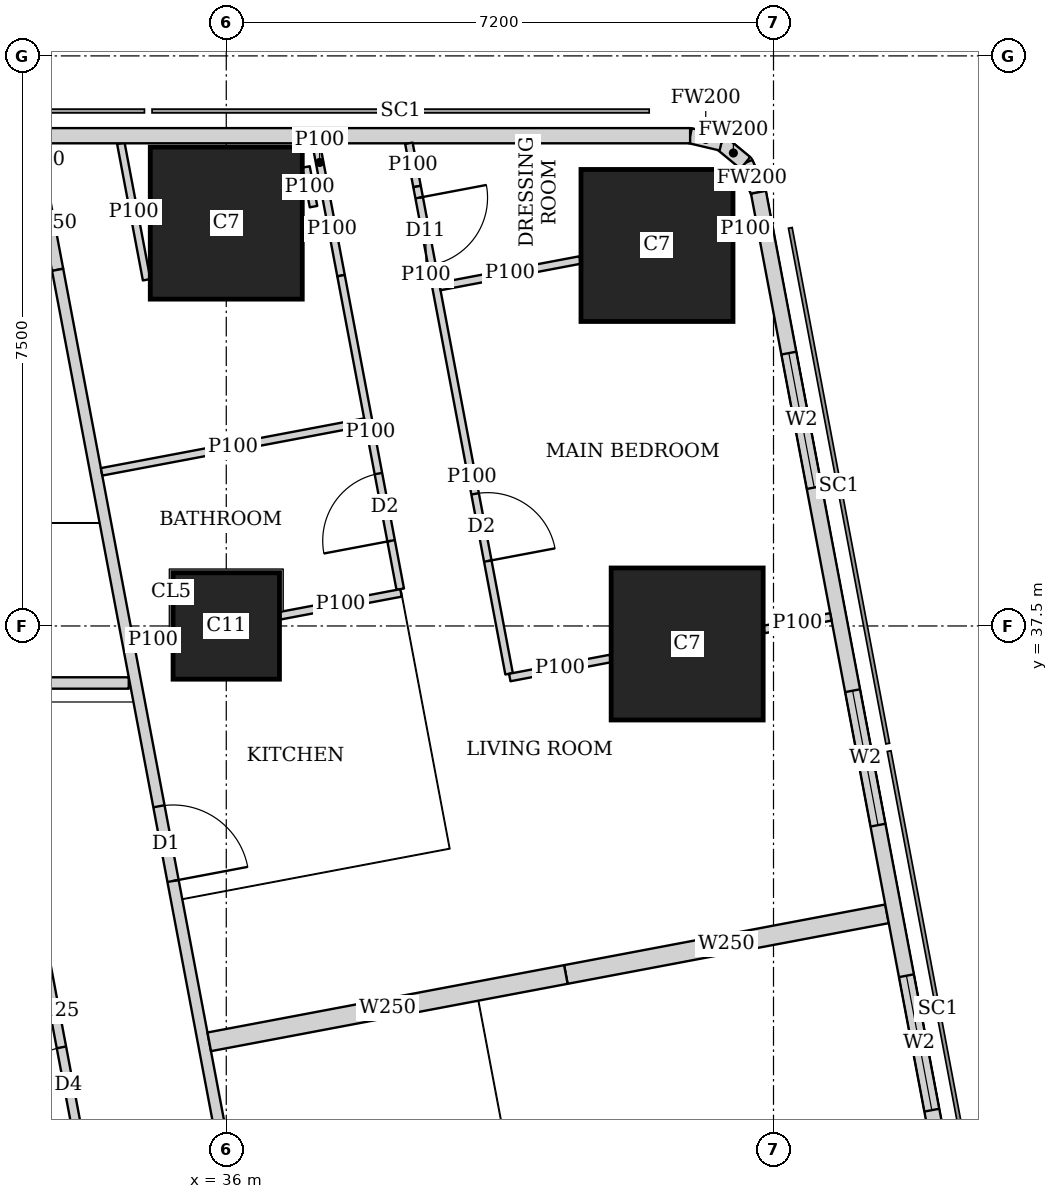
"""IFC4 building model, lengths in metres.
Left out: names, types, materials, properties, quantities, classifications, styles, units other than length and angle.
Written with IfcOpenShell. Run it as: python <this file> out.ifc"""

import sys

from ifc_helpers import new_model, si_unit, direction, frame, frame_2d, origin, origin_2d, place, context, subcontext, project, spatial, rectangle, extrude, element, fill, save


model = new_model("IFC4")
c1 = context("Model", 3, precision=1e-05, world=origin(), true_north=direction((0.0, 1.0)))
c2 = subcontext(c1, "Body", "Model", "MODEL_VIEW")
j1 = project(units=[si_unit("LENGTHUNIT", "METRE"), si_unit("PLANEANGLEUNIT", "RADIAN")], contexts=[c1])
p1 = place(None, origin())
s1 = spatial("IfcSite", under=j1, at=p1, CompositionType="ELEMENT")
p2 = place(p1, origin())
s2 = spatial("IfcBuilding", under=s1, at=p2, CompositionType="ELEMENT")
p3 = place(p2, frame((0.0, 0.0, 259.1)))
s3 = spatial("IfcBuildingStorey", under=s2, at=p3, CompositionType="ELEMENT", Elevation=259.1)
p4 = place(p3, frame((36.0, 37.5, 0.0), z_axis=(0.0, 0.0, 1.0), x_axis=(1.0, 0.0, 0.0)))
e1 = element("IfcColumn", 1, at=p4, inside=s3, PredefinedType="COLUMN", context=c2, shape_type="SweptSolid", body=[
    extrude(rectangle(XDim=1.4, YDim=1.4, at=origin_2d()), origin(), (0.0, 0.0, 1.0), 3.75),
])
for number, where, z_axis, x_axis in (
    (2, (42.064, 37.263, 0.0), (0.0, 0.0, 1.0), (1.0, 0.0, 0.0)),
    (3, (36.0, 42.8, 0.0), (0.0, 0.0, 1.0), (1.0, 0.0, 0.0)),
    (4, (41.667, 42.506, 0.0), (0.0, 0.0, 1.0), (1.0, 0.0, 0.0)),
):
    element("IfcColumn", number, at=place(p3, frame(where, z_axis=z_axis, x_axis=x_axis)), inside=s3, PredefinedType="COLUMN", context=c2, shape_type="SweptSolid", body=[
        extrude(rectangle(XDim=2.0, YDim=2.0, at=origin_2d()), origin(), (0.0, 0.0, 1.0), 3.75),
    ])
p5 = place(p3, frame((49.684, 7.832, 0.0), z_axis=(0.0, 0.0, 1.0), x_axis=(-0.185616669694, 0.982622232565, 0.0)))
e5 = element("IfcWall", 5, at=p5, inside=s3, PredefinedType="SOLIDWALL", context=c2, shape_type="SweptSolid", body=[
    extrude(rectangle(XDim=36.0, YDim=0.2, at=frame_2d((18.0, 0.0))), origin(), (0.0, 0.0, 1.0), 3.5),
])
p6 = place(p5, frame((2.518, 0.0, 0.9)))
e6 = element("IfcOpeningElement", 6, at=p6, cuts=e5, PredefinedType="OPENING", context=c2, shape_type="SweptSolid", body=[
    extrude(rectangle(XDim=2.4, YDim=1.5, at=frame_2d((1.2, 0.75))), frame((0.0, 0.11, 0.0), z_axis=(0.0, -1.0, 0.0), x_axis=(1.0, 0.0, 0.0)), (0.0, 0.0, 1.0), 0.22),
])
p7 = place(p5, frame((8.444, 0.0, 0.9)))
e7 = element("IfcOpeningElement", 7, at=p7, cuts=e5, PredefinedType="OPENING", context=c2, shape_type="SweptSolid", body=[
    extrude(rectangle(XDim=1.8, YDim=1.5, at=frame_2d((0.9, 0.75))), frame((0.0, 0.11, 0.0), z_axis=(0.0, -1.0, 0.0), x_axis=(1.0, 0.0, 0.0)), (0.0, 0.0, 1.0), 0.22),
])
p8 = place(p5, frame((12.261, 0.0, 0.9)))
e8 = element("IfcOpeningElement", 8, at=p8, cuts=e5, PredefinedType="OPENING", context=c2, shape_type="SweptSolid", body=[
    extrude(rectangle(XDim=1.8, YDim=1.5, at=frame_2d((0.9, 0.75))), frame((0.0, 0.11, 0.0), z_axis=(0.0, -1.0, 0.0), x_axis=(1.0, 0.0, 0.0)), (0.0, 0.0, 1.0), 0.22),
])
p9 = place(p5, frame((16.078, 0.0, 0.9)))
e9 = element("IfcOpeningElement", 9, at=p9, cuts=e5, PredefinedType="OPENING", context=c2, shape_type="SweptSolid", body=[
    extrude(rectangle(XDim=1.8, YDim=1.5, at=frame_2d((0.9, 0.75))), frame((0.0, 0.11, 0.0), z_axis=(0.0, -1.0, 0.0), x_axis=(1.0, 0.0, 0.0)), (0.0, 0.0, 1.0), 0.22),
])
p10 = place(p5, frame((19.894, 0.0, 0.9)))
e10 = element("IfcOpeningElement", 10, at=p10, cuts=e5, PredefinedType="OPENING", context=c2, shape_type="SweptSolid", body=[
    extrude(rectangle(XDim=1.8, YDim=1.5, at=frame_2d((0.9, 0.75))), frame((0.0, 0.11, 0.0), z_axis=(0.0, -1.0, 0.0), x_axis=(1.0, 0.0, 0.0)), (0.0, 0.0, 1.0), 0.22),
])
p11 = place(p5, frame((23.71, 0.0, 0.9)))
e11 = element("IfcOpeningElement", 11, at=p11, cuts=e5, PredefinedType="OPENING", context=c2, shape_type="SweptSolid", body=[
    extrude(rectangle(XDim=1.8, YDim=1.5, at=frame_2d((0.9, 0.75))), frame((0.0, 0.11, 0.0), z_axis=(0.0, -1.0, 0.0), x_axis=(1.0, 0.0, 0.0)), (0.0, 0.0, 1.0), 0.22),
])
p12 = place(p5, frame((27.526, 0.0, 0.9)))
e12 = element("IfcOpeningElement", 12, at=p12, cuts=e5, PredefinedType="OPENING", context=c2, shape_type="SweptSolid", body=[
    extrude(rectangle(XDim=1.8, YDim=1.5, at=frame_2d((0.9, 0.75))), frame((0.0, 0.11, 0.0), z_axis=(0.0, -1.0, 0.0), x_axis=(1.0, 0.0, 0.0)), (0.0, 0.0, 1.0), 0.22),
])
p13 = place(p5, frame((32.046, 0.0, 0.9)))
e13 = element("IfcOpeningElement", 13, at=p13, cuts=e5, PredefinedType="OPENING", context=c2, shape_type="SweptSolid", body=[
    extrude(rectangle(XDim=1.8, YDim=1.5, at=frame_2d((0.9, 0.75))), frame((0.0, 0.11, 0.0), z_axis=(0.0, -1.0, 0.0), x_axis=(1.0, 0.0, 0.0)), (0.0, 0.0, 1.0), 0.22),
])
p14 = place(p3, frame((43.002, 43.206, 0.0), z_axis=(0.0, 0.0, 1.0), x_axis=(-0.40678170573, 0.913525393124, 0.0)))
e14 = element("IfcWall", 14, at=p14, inside=s3, PredefinedType="SOLIDWALL", context=c2, shape_type="SweptSolid", body=[
    extrude(rectangle(XDim=0.423, YDim=0.2, at=frame_2d((0.211, 0.0))), origin(), (0.0, 0.0, 1.0), 3.5),
])
p15 = place(p3, frame((42.83, 43.592, 0.0), z_axis=(0.0, 0.0, 1.0), x_axis=(-0.771190539797, 0.636604391539, 0.0)))
e15 = element("IfcWall", 15, at=p15, inside=s3, PredefinedType="SOLIDWALL", context=c2, shape_type="SweptSolid", body=[
    extrude(rectangle(XDim=0.41, YDim=0.2, at=frame_2d((0.205, 0.0))), origin(), (0.0, 0.0, 1.0), 3.5),
])
p16 = place(p3, frame((42.514, 43.853, 0.0), z_axis=(0.0, 0.0, 1.0), x_axis=(-0.973288080424, 0.229587265555, 0.0)))
e16 = element("IfcWall", 16, at=p16, inside=s3, PredefinedType="SOLIDWALL", context=c2, shape_type="SweptSolid", body=[
    extrude(rectangle(XDim=0.422, YDim=0.2, at=frame_2d((0.211, 0.0))), origin(), (0.0, 0.0, 1.0), 3.5),
])
p17 = place(p3, frame((42.103, 43.95, 0.0), z_axis=(0.0, 0.0, 1.0), x_axis=(-1.0, 0.0, 0.0)))
e17 = element("IfcWall", 17, at=p17, inside=s3, PredefinedType="SOLIDWALL", context=c2, shape_type="SweptSolid", body=[
    extrude(rectangle(XDim=27.54, YDim=0.2, at=frame_2d((13.77, 0.0))), origin(), (0.0, 0.0, 1.0), 3.5),
])
p18 = place(p17, frame((10.603, 0.0, 0.9)))
e18 = element("IfcOpeningElement", 18, at=p18, cuts=e17, PredefinedType="OPENING", context=c2, shape_type="SweptSolid", body=[
    extrude(rectangle(XDim=1.8, YDim=1.5, at=frame_2d((0.9, 0.75))), frame((0.0, 0.11, 0.0), z_axis=(0.0, -1.0, 0.0), x_axis=(1.0, 0.0, 0.0)), (0.0, 0.0, 1.0), 0.22),
])
p19 = place(p17, frame((14.203, 0.0, 0.9)))
e19 = element("IfcOpeningElement", 19, at=p19, cuts=e17, PredefinedType="OPENING", context=c2, shape_type="SweptSolid", body=[
    extrude(rectangle(XDim=1.8, YDim=1.5, at=frame_2d((0.9, 0.75))), frame((0.0, 0.11, 0.0), z_axis=(0.0, -1.0, 0.0), x_axis=(1.0, 0.0, 0.0)), (0.0, 0.0, 1.0), 0.22),
])
p20 = place(p17, frame((17.803, 0.0, 0.9)))
e20 = element("IfcOpeningElement", 20, at=p20, cuts=e17, PredefinedType="OPENING", context=c2, shape_type="SweptSolid", body=[
    extrude(rectangle(XDim=1.8, YDim=1.5, at=frame_2d((0.9, 0.75))), frame((0.0, 0.11, 0.0), z_axis=(0.0, -1.0, 0.0), x_axis=(1.0, 0.0, 0.0)), (0.0, 0.0, 1.0), 0.22),
])
p21 = place(p17, frame((22.822, 0.0, 0.9)))
e21 = element("IfcOpeningElement", 21, at=p21, cuts=e17, PredefinedType="OPENING", context=c2, shape_type="SweptSolid", body=[
    extrude(rectangle(XDim=2.4, YDim=1.5, at=frame_2d((1.2, 0.75))), frame((0.0, 0.11, 0.0), z_axis=(0.0, -1.0, 0.0), x_axis=(1.0, 0.0, 0.0)), (0.0, 0.0, 1.0), 0.22),
])
p22 = place(p3, frame((29.501, 36.75, 0.0), z_axis=(0.0, 0.0, 1.0), x_axis=(1.0, 0.0, 0.0)))
e22 = element("IfcWall", 22, at=p22, inside=s3, PredefinedType="SOLIDWALL", context=c2, shape_type="SweptSolid", body=[
    extrude(rectangle(XDim=5.216, YDim=0.15, at=frame_2d((2.608, 0.0))), origin(), (0.0, 0.0, 1.0), 3.5),
])
p23 = place(p22, frame((1.803, 0.0, 0.0)))
e23 = element("IfcOpeningElement", 23, at=p23, cuts=e22, PredefinedType="OPENING", context=c2, shape_type="SweptSolid", body=[
    extrude(rectangle(XDim=1.0, YDim=2.1, at=frame_2d((0.5, 1.05))), frame((0.0, 0.085, 0.0), z_axis=(0.0, -1.0, 0.0), x_axis=(1.0, 0.0, 0.0)), (0.0, 0.0, 1.0), 0.17),
])
p24 = place(p3, frame((33.549, 43.414, 0.0), z_axis=(0.0, 0.0, 1.0), x_axis=(0.185585816539, -0.982628060204, 0.0)))
e24 = element("IfcWall", 24, at=p24, inside=s3, PredefinedType="SOLIDWALL", context=c2, shape_type="SweptSolid", body=[
    extrude(rectangle(XDim=1.25, YDim=0.15, at=frame_2d((0.625, 0.0))), origin(), (0.0, 0.0, 1.0), 2.05),
])
p25 = place(p3, frame((33.781, 42.186, 0.0), z_axis=(0.0, 0.0, 1.0), x_axis=(0.185593518645, -0.9826266055, 0.0)))
e25 = element("IfcWall", 25, at=p25, inside=s3, PredefinedType="SOLIDWALL", context=c2, shape_type="SweptSolid", body=[
    extrude(rectangle(XDim=35.961, YDim=0.15, at=frame_2d((17.98, 0.0))), origin(), (0.0, 0.0, 1.0), 2.5),
])
p26 = place(p25, frame((7.183, 0.0, 0.0)))
e26 = element("IfcOpeningElement", 26, at=p26, cuts=e25, PredefinedType="OPENING", context=c2, shape_type="SweptSolid", body=[
    extrude(rectangle(XDim=1.0, YDim=2.1, at=frame_2d((0.5, 1.05))), frame((0.0, 0.085, 0.0), z_axis=(0.0, -1.0, 0.0), x_axis=(1.0, 0.0, 0.0)), (0.0, 0.0, 1.0), 0.17),
])
p27 = place(p25, frame((11.76, 0.0, 0.0)))
e27 = element("IfcOpeningElement", 27, at=p27, cuts=e25, PredefinedType="OPENING", context=c2, shape_type="SweptSolid", body=[
    extrude(rectangle(XDim=1.0, YDim=2.1, at=frame_2d((0.5, 1.05))), frame((0.0, 0.085, 0.0), z_axis=(0.0, -1.0, 0.0), x_axis=(1.0, 0.0, 0.0)), (0.0, 0.0, 1.0), 0.17),
])
p28 = place(p25, frame((23.863, 0.0, 0.0)))
e28 = element("IfcOpeningElement", 28, at=p28, cuts=e25, PredefinedType="OPENING", context=c2, shape_type="SweptSolid", body=[
    extrude(rectangle(XDim=1.0, YDim=2.1, at=frame_2d((0.5, 1.05))), frame((0.0, 0.085, 0.0), z_axis=(0.0, -1.0, 0.0), x_axis=(1.0, 0.0, 0.0)), (0.0, 0.0, 1.0), 0.17),
])
p29 = place(p25, frame((30.502, 0.0, 0.0)))
e29 = element("IfcOpeningElement", 29, at=p29, cuts=e25, PredefinedType="OPENING", context=c2, shape_type="SweptSolid", body=[
    extrude(rectangle(XDim=1.0, YDim=2.1, at=frame_2d((0.5, 1.05))), frame((0.0, 0.085, 0.0), z_axis=(0.0, -1.0, 0.0), x_axis=(1.0, 0.0, 0.0)), (0.0, 0.0, 1.0), 0.17),
])
p30 = place(p3, frame((34.952, 42.055, 0.0), z_axis=(0.0, 0.0, 1.0), x_axis=(-0.185490642006, 0.98264603074, 0.0)))
e30 = element("IfcWall", 30, at=p30, inside=s3, PredefinedType="PARTITIONING", context=c2, shape_type="SweptSolid", body=[
    extrude(rectangle(XDim=1.827, YDim=0.1, at=frame_2d((0.914, 0.0))), origin(), (0.0, 0.0, 1.0), 2.05),
])
p31 = place(p3, frame((37.049, 43.539, 0.0), z_axis=(0.0, 0.0, 1.0), x_axis=(0.186119495745, -0.982527115811, 0.0)))
e31 = element("IfcWall", 31, at=p31, inside=s3, PredefinedType="PARTITIONING", context=c2, shape_type="SweptSolid", body=[
    extrude(rectangle(XDim=0.531, YDim=0.1, at=frame_2d((0.266, 0.0))), origin(), (0.0, 0.0, 1.0), 2.05),
])
p32 = place(p3, frame((38.403, 43.85, 0.0), z_axis=(0.0, 0.0, 1.0), x_axis=(0.184976954078, -0.982742858768, 0.0)))
e32 = element("IfcWall", 32, at=p32, inside=s3, PredefinedType="PARTITIONING", context=c2, shape_type="SweptSolid", body=[
    extrude(rectangle(XDim=0.578, YDim=0.1, at=frame_2d((0.289, 0.0))), origin(), (0.0, 0.0, 1.0), 3.5),
])
p33 = place(p3, frame((38.51, 43.282, 0.0), z_axis=(0.0, 0.0, 1.0), x_axis=(0.185775287495, -0.982592256511, 0.0)))
e33 = element("IfcWall", 33, at=p33, inside=s3, PredefinedType="PARTITIONING", context=c2, shape_type="SweptSolid", body=[
    extrude(rectangle(XDim=1.259, YDim=0.1, at=frame_2d((0.629, 0.0))), origin(), (0.0, 0.0, 1.0), 2.05),
])
p34 = place(p33, frame((0.15, 0.0, 0.0)))
e34 = element("IfcOpeningElement", 34, at=p34, cuts=e33, PredefinedType="OPENING", context=c2, shape_type="SweptSolid", body=[
    extrude(rectangle(XDim=0.9, YDim=2.0, at=frame_2d((0.45, 1.0))), frame((0.0, 0.06, 0.0), z_axis=(0.0, -1.0, 0.0), x_axis=(1.0, 0.0, 0.0)), (0.0, 0.0, 1.0), 0.12),
])
p35 = place(p3, frame((38.744, 42.045, 0.0), z_axis=(0.0, 0.0, 1.0), x_axis=(0.185564988614, -0.982631993679, 0.0)))
e35 = element("IfcWall", 35, at=p35, inside=s3, PredefinedType="PARTITIONING", context=c2, shape_type="SweptSolid", body=[
    extrude(rectangle(XDim=5.265, YDim=0.1, at=frame_2d((2.633, 0.0))), origin(), (0.0, 0.0, 1.0), 3.5),
])
p36 = place(p35, frame((2.856, 0.0, 0.0)))
e36 = element("IfcOpeningElement", 36, at=p36, cuts=e35, PredefinedType="OPENING", context=c2, shape_type="SweptSolid", body=[
    extrude(rectangle(XDim=0.9, YDim=2.1, at=frame_2d((0.45, 1.05))), frame((0.0, 0.06, 0.0), z_axis=(0.0, -1.0, 0.0), x_axis=(1.0, 0.0, 0.0)), (0.0, 0.0, 1.0), 0.12),
])
p37 = place(p3, frame((37.181, 43.85, 0.0), z_axis=(0.0, 0.0, 1.0), x_axis=(0.185121727606, -0.982715597703, 0.0)))
e37 = element("IfcWall", 37, at=p37, inside=s3, PredefinedType="PARTITIONING", context=c2, shape_type="SweptSolid", body=[
    extrude(rectangle(XDim=0.513, YDim=0.1, at=frame_2d((0.256, 0.0))), origin(), (0.0, 0.0, 1.0), 3.5),
])
p38 = place(p3, frame((37.276, 43.346, 0.0), z_axis=(0.0, 0.0, 1.0), x_axis=(0.185962504646, -0.982556841544, 0.0)))
e38 = element("IfcWall", 38, at=p38, inside=s3, PredefinedType="PARTITIONING", context=c2, shape_type="SweptSolid", body=[
    extrude(rectangle(XDim=1.259, YDim=0.1, at=frame_2d((0.629, 0.0))), origin(), (0.0, 0.0, 1.0), 2.05),
])
p39 = place(p3, frame((37.51, 42.109, 0.0), z_axis=(0.0, 0.0, 1.0), x_axis=(0.185580569503, -0.98262905118, 0.0)))
e39 = element("IfcWall", 39, at=p39, inside=s3, PredefinedType="PARTITIONING", context=c2, shape_type="SweptSolid", body=[
    extrude(rectangle(XDim=4.198, YDim=0.1, at=frame_2d((2.099, 0.0))), origin(), (0.0, 0.0, 1.0), 3.5),
])
p40 = place(p39, frame((2.65, 0.0, 0.0)))
e40 = element("IfcOpeningElement", 40, at=p40, cuts=e39, PredefinedType="OPENING", context=c2, shape_type="SweptSolid", body=[
    extrude(rectangle(XDim=0.9, YDim=2.1, at=frame_2d((0.45, 1.05))), frame((0.0, 0.06, 0.0), z_axis=(0.0, -1.0, 0.0), x_axis=(1.0, 0.0, 0.0)), (0.0, 0.0, 1.0), 0.12),
])
p41 = place(p3, frame((42.985, 42.755, 0.0), z_axis=(0.0, 0.0, 1.0), x_axis=(-0.98281924824, -0.184570651215, 0.0)))
e41 = element("IfcWall", 41, at=p41, inside=s3, PredefinedType="PARTITIONING", context=c2, shape_type="SweptSolid", body=[
    extrude(rectangle(XDim=0.313, YDim=0.1, at=frame_2d((0.157, 0.0))), origin(), (0.0, 0.0, 1.0), 3.5),
])
p42 = place(p3, frame((40.657, 42.315, 0.0), z_axis=(0.0, 0.0, 1.0), x_axis=(-0.982622785543, -0.185613742305, 0.0)))
e42 = element("IfcWall", 42, at=p42, inside=s3, PredefinedType="PARTITIONING", context=c2, shape_type="SweptSolid", body=[
    extrude(rectangle(XDim=1.88, YDim=0.1, at=frame_2d((0.94, 0.0))), origin(), (0.0, 0.0, 1.0), 2.05),
])
p43 = place(p3, frame((43.955, 37.62, 0.0), z_axis=(0.0, 0.0, 1.0), x_axis=(-0.982708424405, -0.18515980288, 0.0)))
e43 = element("IfcWall", 43, at=p43, inside=s3, PredefinedType="PARTITIONING", context=c2, shape_type="SweptSolid", body=[
    extrude(rectangle(XDim=0.897, YDim=0.1, at=frame_2d((0.448, 0.0))), origin(), (0.0, 0.0, 1.0), 3.5),
])
p44 = place(p3, frame((41.054, 37.072, 0.0), z_axis=(0.0, 0.0, 1.0), x_axis=(-0.982635482721, -0.18554651195, 0.0)))
e44 = element("IfcWall", 44, at=p44, inside=s3, PredefinedType="PARTITIONING", context=c2, shape_type="SweptSolid", body=[
    extrude(rectangle(XDim=1.347, YDim=0.1, at=frame_2d((0.674, 0.0))), origin(), (0.0, 0.0, 1.0), 3.5),
])
p45 = place(p3, frame((37.823, 40.182, 0.0), z_axis=(0.0, 0.0, 1.0), x_axis=(-0.98263926043, -0.185526504472, 0.0)))
e45 = element("IfcWall", 45, at=p45, inside=s3, PredefinedType="PARTITIONING", context=c2, shape_type="SweptSolid", body=[
    extrude(rectangle(XDim=3.524, YDim=0.1, at=frame_2d((1.762, 0.0))), origin(), (0.0, 0.0, 1.0), 3.5),
])
p46 = place(p3, frame((38.299, 37.935, 0.0), z_axis=(0.0, 0.0, 1.0), x_axis=(-0.98263725405, -0.185537130931, 0.0)))
e46 = element("IfcWall", 46, at=p46, inside=s3, PredefinedType="PARTITIONING", context=c2, shape_type="SweptSolid", body=[
    extrude(rectangle(XDim=1.617, YDim=0.1, at=frame_2d((0.809, 0.0))), origin(), (0.0, 0.0, 1.0), 3.5),
])
p47 = place(p3, frame((35.29, 37.366, 0.0), z_axis=(0.0, 0.0, 1.0), x_axis=(-0.982715597703, -0.185121727606, 0.0)))
e47 = element("IfcWall", 47, at=p47, inside=s3, PredefinedType="PARTITIONING", context=c2, shape_type="SweptSolid", body=[
    extrude(rectangle(XDim=0.513, YDim=0.1, at=frame_2d((0.256, 0.0))), origin(), (0.0, 0.0, 1.0), 3.5),
])
p48 = place(p3, frame((44.693, 33.713, 0.0), z_axis=(0.0, 0.0, 1.0), x_axis=(-0.982633535512, -0.185556823879, 0.0)))
e48 = element("IfcWall", 48, at=p48, inside=s3, PredefinedType="SOLIDWALL", context=c2, shape_type="SweptSolid", body=[
    extrude(rectangle(XDim=4.3, YDim=0.25, at=frame_2d((2.15, 0.0))), origin(), (0.0, 0.0, 1.0), 2.5),
])
p49 = place(p3, frame((40.468, 32.915, 0.0), z_axis=(0.0, 0.0, 1.0), x_axis=(-0.982635807605, -0.185544791394, 0.0)))
e49 = element("IfcWall", 49, at=p49, inside=s3, PredefinedType="SOLIDWALL", context=c2, shape_type="SweptSolid", body=[
    extrude(rectangle(XDim=4.775, YDim=0.25, at=frame_2d((2.388, 0.0))), origin(), (0.0, 0.0, 1.0), 3.5),
])
p50 = place(p3, frame((34.193, 30.04, 0.0), z_axis=(0.0, 0.0, 1.0), x_axis=(-0.185556349615, 0.98263362507, 0.0)))
e50 = element("IfcWall", 50, at=p50, inside=s3, PredefinedType="PARTITIONING", context=c2, shape_type="SweptSolid", body=[
    extrude(rectangle(XDim=4.883, YDim=0.125, at=frame_2d((2.441, 0.0))), origin(), (0.0, 0.0, 1.0), 2.5),
])
p51 = place(p50, frame((0.95, 0.0, 0.0)))
e51 = element("IfcOpeningElement", 51, at=p51, cuts=e50, PredefinedType="OPENING", context=c2, shape_type="SweptSolid", body=[
    extrude(rectangle(XDim=1.0, YDim=2.1, at=frame_2d((0.5, 1.05))), frame((0.0, 0.073, 0.0), z_axis=(0.0, -1.0, 0.0), x_axis=(1.0, 0.0, 0.0)), (0.0, 0.0, 1.0), 0.145),
])
p52 = place(p11, origin())
e52 = element("IfcWindow", 52, at=p52, inside=s3, PartitioningType="SINGLE_PANEL", PredefinedType="WINDOW", context=c2, shape_type="SweptSolid", body=[
    extrude(rectangle(XDim=1.8, YDim=1.5, at=frame_2d((0.9, 0.75))), frame((0.0, 0.03, 0.0), z_axis=(0.0, -1.0, 0.0), x_axis=(1.0, 0.0, 0.0)), (0.0, 0.0, 1.0), 0.06),
])
fill(e11, e52)
p53 = place(p12, origin())
e53 = element("IfcWindow", 53, at=p53, inside=s3, PartitioningType="SINGLE_PANEL", PredefinedType="WINDOW", context=c2, shape_type="SweptSolid", body=[
    extrude(rectangle(XDim=1.8, YDim=1.5, at=frame_2d((0.9, 0.75))), frame((0.0, 0.03, 0.0), z_axis=(0.0, -1.0, 0.0), x_axis=(1.0, 0.0, 0.0)), (0.0, 0.0, 1.0), 0.06),
])
fill(e12, e53)
p54 = place(p13, origin())
e54 = element("IfcWindow", 54, at=p54, inside=s3, PartitioningType="SINGLE_PANEL", PredefinedType="WINDOW", context=c2, shape_type="SweptSolid", body=[
    extrude(rectangle(XDim=1.8, YDim=1.5, at=frame_2d((0.9, 0.75))), frame((0.0, 0.03, 0.0), z_axis=(0.0, -1.0, 0.0), x_axis=(1.0, 0.0, 0.0)), (0.0, 0.0, 1.0), 0.06),
])
fill(e13, e54)
p55 = place(p34, origin())
e55 = element("IfcDoor", 55, at=p55, inside=s3, OperationType="SINGLE_SWING_LEFT", PredefinedType="DOOR", context=c2, shape_type="SweptSolid", body=[
    extrude(rectangle(XDim=0.9, YDim=2.0, at=frame_2d((0.45, 1.0))), frame((0.0, 0.025, 0.0), z_axis=(0.0, -1.0, 0.0), x_axis=(1.0, 0.0, 0.0)), (0.0, 0.0, 1.0), 0.05),
])
fill(e34, e55)
p56 = place(p36, origin())
e56 = element("IfcDoor", 56, at=p56, inside=s3, OperationType="SINGLE_SWING_RIGHT", PredefinedType="DOOR", context=c2, shape_type="SweptSolid", body=[
    extrude(rectangle(XDim=0.9, YDim=2.1, at=frame_2d((0.45, 1.05))), frame((0.0, 0.025, 0.0), z_axis=(0.0, -1.0, 0.0), x_axis=(1.0, 0.0, 0.0)), (0.0, 0.0, 1.0), 0.05),
])
fill(e36, e56)
p57 = place(p40, origin())
e57 = element("IfcDoor", 57, at=p57, inside=s3, OperationType="SINGLE_SWING_LEFT", PredefinedType="DOOR", context=c2, shape_type="SweptSolid", body=[
    extrude(rectangle(XDim=0.9, YDim=2.1, at=frame_2d((0.45, 1.05))), frame((0.0, 0.025, 0.0), z_axis=(0.0, -1.0, 0.0), x_axis=(1.0, 0.0, 0.0)), (0.0, 0.0, 1.0), 0.05),
])
fill(e40, e57)
p58 = place(p26, origin())
e58 = element("IfcDoor", 58, at=p58, inside=s3, OperationType="SINGLE_SWING_RIGHT", PredefinedType="DOOR", context=c2, shape_type="SweptSolid", body=[
    extrude(rectangle(XDim=1.0, YDim=2.1, at=frame_2d((0.5, 1.05))), frame((0.0, 0.025, 0.0), z_axis=(0.0, -1.0, 0.0), x_axis=(1.0, 0.0, 0.0)), (0.0, 0.0, 1.0), 0.05),
])
fill(e26, e58)
p59 = place(p51, origin())
e59 = element("IfcDoor", 59, at=p59, inside=s3, OperationType="SINGLE_SWING_LEFT", PredefinedType="DOOR", context=c2, shape_type="SweptSolid", body=[
    extrude(rectangle(XDim=1.0, YDim=2.1, at=frame_2d((0.5, 1.05))), frame((0.0, 0.025, 0.0), z_axis=(0.0, -1.0, 0.0), x_axis=(1.0, 0.0, 0.0)), (0.0, 0.0, 1.0), 0.05),
])
fill(e51, e59)
save(model, sys.argv[1])
